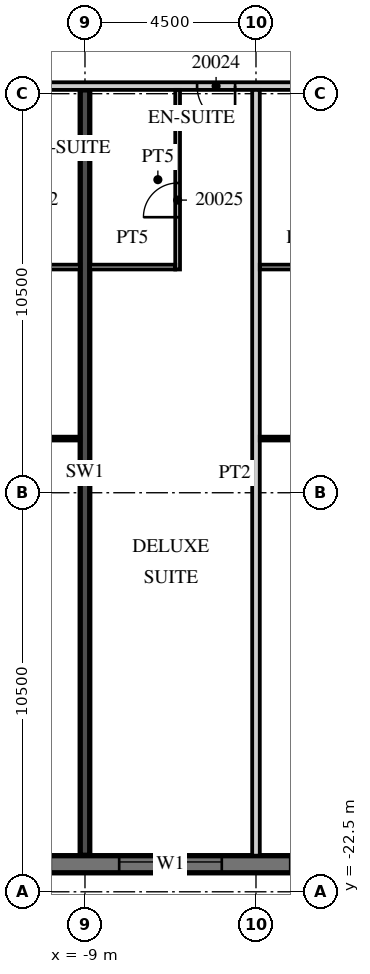
"""IFC4 building model, lengths in metres.
Left out: names, types, materials, properties, quantities, classifications, styles, units other than length and angle.
Written with IfcOpenShell. Run it as: python <this file> out.ifc"""

import sys

from ifc_helpers import new_model, si_unit, direction, frame, frame_2d, origin, place, context, subcontext, project, spatial, rectangle, extrude, element, fill, save


model = new_model("IFC4")
c1 = context("Model", 3, precision=1e-05, world=origin(), true_north=direction((0.0, 1.0)))
c2 = subcontext(c1, "Body", "Model", "MODEL_VIEW")
j1 = project(units=[si_unit("LENGTHUNIT", "METRE"), si_unit("PLANEANGLEUNIT", "RADIAN")], contexts=[c1])
p1 = place(None, origin())
s1 = spatial("IfcSite", under=j1, at=p1, CompositionType="ELEMENT")
p2 = place(p1, origin())
s2 = spatial("IfcBuilding", under=s1, at=p2, CompositionType="ELEMENT")
p3 = place(p2, frame((0.0, 0.0, 96.3)))
s3 = spatial("IfcBuildingStorey", under=s2, at=p3, CompositionType="ELEMENT", Elevation=96.3)
p4 = place(p3, frame((-9.0, -21.54, 0.0), z_axis=(0.0, 0.0, 1.0), x_axis=(0.0, 1.0, 0.0)))
e1 = element("IfcWall", 1, at=p4, inside=s3, PredefinedType="SHEAR", context=c2, shape_type="SweptSolid", body=[
    extrude(rectangle(XDim=20.14, YDim=0.25, at=frame_2d((10.07, 0.0))), origin(), (0.0, 0.0, 1.0), 3.0),
])
p5 = place(p3, frame((-13.5, -21.775, 0.0), z_axis=(0.0, 0.0, 1.0), x_axis=(1.0, 0.0, 0.0)))
e2 = element("IfcWall", 2, at=p5, inside=s3, PredefinedType="SOLIDWALL", context=c2, shape_type="SweptSolid", body=[
    extrude(rectangle(XDim=54.5, YDim=0.45, at=frame_2d((27.25, 0.0))), origin(), (0.0, 0.0, 1.0), 3.0),
])
p6 = place(p5, frame((0.9, 0.0, 0.45)))
e3 = element("IfcOpeningElement", 3, at=p6, cuts=e2, PredefinedType="OPENING", context=c2, shape_type="SweptSolid", body=[
    extrude(rectangle(XDim=2.7, YDim=2.25, at=frame_2d((1.35, 1.125))), frame((0.0, 0.235, 0.0), z_axis=(0.0, -1.0, 0.0), x_axis=(1.0, 0.0, 0.0)), (0.0, 0.0, 1.0), 0.47),
])
p7 = place(p5, frame((5.4, 0.0, 0.45)))
e4 = element("IfcOpeningElement", 4, at=p7, cuts=e2, PredefinedType="OPENING", context=c2, shape_type="SweptSolid", body=[
    extrude(rectangle(XDim=2.7, YDim=2.25, at=frame_2d((1.35, 1.125))), frame((0.0, 0.235, 0.0), z_axis=(0.0, -1.0, 0.0), x_axis=(1.0, 0.0, 0.0)), (0.0, 0.0, 1.0), 0.47),
])
p8 = place(p5, frame((9.9, 0.0, 0.45)))
e5 = element("IfcOpeningElement", 5, at=p8, cuts=e2, PredefinedType="OPENING", context=c2, shape_type="SweptSolid", body=[
    extrude(rectangle(XDim=2.7, YDim=2.25, at=frame_2d((1.35, 1.125))), frame((0.0, 0.235, 0.0), z_axis=(0.0, -1.0, 0.0), x_axis=(1.0, 0.0, 0.0)), (0.0, 0.0, 1.0), 0.47),
])
p9 = place(p5, frame((14.4, 0.0, 0.45)))
e6 = element("IfcOpeningElement", 6, at=p9, cuts=e2, PredefinedType="OPENING", context=c2, shape_type="SweptSolid", body=[
    extrude(rectangle(XDim=2.7, YDim=2.25, at=frame_2d((1.35, 1.125))), frame((0.0, 0.235, 0.0), z_axis=(0.0, -1.0, 0.0), x_axis=(1.0, 0.0, 0.0)), (0.0, 0.0, 1.0), 0.47),
])
p10 = place(p5, frame((18.9, 0.0, 0.45)))
e7 = element("IfcOpeningElement", 7, at=p10, cuts=e2, PredefinedType="OPENING", context=c2, shape_type="SweptSolid", body=[
    extrude(rectangle(XDim=2.7, YDim=2.25, at=frame_2d((1.35, 1.125))), frame((0.0, 0.235, 0.0), z_axis=(0.0, -1.0, 0.0), x_axis=(1.0, 0.0, 0.0)), (0.0, 0.0, 1.0), 0.47),
])
p11 = place(p5, frame((23.4, 0.0, 0.45)))
e8 = element("IfcOpeningElement", 8, at=p11, cuts=e2, PredefinedType="OPENING", context=c2, shape_type="SweptSolid", body=[
    extrude(rectangle(XDim=2.7, YDim=2.25, at=frame_2d((1.35, 1.125))), frame((0.0, 0.235, 0.0), z_axis=(0.0, -1.0, 0.0), x_axis=(1.0, 0.0, 0.0)), (0.0, 0.0, 1.0), 0.47),
])
p12 = place(p5, frame((27.9, 0.0, 0.45)))
e9 = element("IfcOpeningElement", 9, at=p12, cuts=e2, PredefinedType="OPENING", context=c2, shape_type="SweptSolid", body=[
    extrude(rectangle(XDim=2.7, YDim=2.25, at=frame_2d((1.35, 1.125))), frame((0.0, 0.235, 0.0), z_axis=(0.0, -1.0, 0.0), x_axis=(1.0, 0.0, 0.0)), (0.0, 0.0, 1.0), 0.47),
])
p13 = place(p5, frame((32.4, 0.0, 0.45)))
e10 = element("IfcOpeningElement", 10, at=p13, cuts=e2, PredefinedType="OPENING", context=c2, shape_type="SweptSolid", body=[
    extrude(rectangle(XDim=2.7, YDim=2.25, at=frame_2d((1.35, 1.125))), frame((0.0, 0.235, 0.0), z_axis=(0.0, -1.0, 0.0), x_axis=(1.0, 0.0, 0.0)), (0.0, 0.0, 1.0), 0.47),
])
p14 = place(p5, frame((36.9, 0.0, 0.45)))
e11 = element("IfcOpeningElement", 11, at=p14, cuts=e2, PredefinedType="OPENING", context=c2, shape_type="SweptSolid", body=[
    extrude(rectangle(XDim=2.7, YDim=2.25, at=frame_2d((1.35, 1.125))), frame((0.0, 0.235, 0.0), z_axis=(0.0, -1.0, 0.0), x_axis=(1.0, 0.0, 0.0)), (0.0, 0.0, 1.0), 0.47),
])
p15 = place(p5, frame((41.4, 0.0, 0.45)))
e12 = element("IfcOpeningElement", 12, at=p15, cuts=e2, PredefinedType="OPENING", context=c2, shape_type="SweptSolid", body=[
    extrude(rectangle(XDim=2.7, YDim=2.25, at=frame_2d((1.35, 1.125))), frame((0.0, 0.235, 0.0), z_axis=(0.0, -1.0, 0.0), x_axis=(1.0, 0.0, 0.0)), (0.0, 0.0, 1.0), 0.47),
])
p16 = place(p5, frame((45.9, 0.0, 0.45)))
e13 = element("IfcOpeningElement", 13, at=p16, cuts=e2, PredefinedType="OPENING", context=c2, shape_type="SweptSolid", body=[
    extrude(rectangle(XDim=2.7, YDim=2.25, at=frame_2d((1.35, 1.125))), frame((0.0, 0.235, 0.0), z_axis=(0.0, -1.0, 0.0), x_axis=(1.0, 0.0, 0.0)), (0.0, 0.0, 1.0), 0.47),
])
p17 = place(p5, frame((50.4, 0.0, 0.45)))
e14 = element("IfcOpeningElement", 14, at=p17, cuts=e2, PredefinedType="OPENING", context=c2, shape_type="SweptSolid", body=[
    extrude(rectangle(XDim=2.7, YDim=2.25, at=frame_2d((1.35, 1.125))), frame((0.0, 0.235, 0.0), z_axis=(0.0, -1.0, 0.0), x_axis=(1.0, 0.0, 0.0)), (0.0, 0.0, 1.0), 0.47),
])
p18 = place(p3, frame((-13.5, -1.3, 0.0), z_axis=(0.0, 0.0, 1.0), x_axis=(1.0, 0.0, 0.0)))
e15 = element("IfcWall", 15, at=p18, inside=s3, PredefinedType="PARTITIONING", context=c2, shape_type="SweptSolid", body=[
    extrude(rectangle(XDim=58.05, YDim=0.2, at=frame_2d((29.025, 0.0))), origin(), (0.0, 0.0, 1.0), 3.0),
])
p19 = place(p18, frame((0.575, 0.0, 0.0)))
e16 = element("IfcOpeningElement", 16, at=p19, cuts=e15, PredefinedType="OPENING", context=c2, shape_type="SweptSolid", body=[
    extrude(rectangle(XDim=1.0, YDim=2.1, at=frame_2d((0.5, 1.05))), frame((0.0, 0.11, 0.0), z_axis=(0.0, -1.0, 0.0), x_axis=(1.0, 0.0, 0.0)), (0.0, 0.0, 1.0), 0.22),
])
p20 = place(p18, frame((7.45, 0.0, 0.0)))
e17 = element("IfcOpeningElement", 17, at=p20, cuts=e15, PredefinedType="OPENING", context=c2, shape_type="SweptSolid", body=[
    extrude(rectangle(XDim=1.0, YDim=2.1, at=frame_2d((0.5, 1.05))), frame((0.0, 0.11, 0.0), z_axis=(0.0, -1.0, 0.0), x_axis=(1.0, 0.0, 0.0)), (0.0, 0.0, 1.0), 0.22),
])
p21 = place(p18, frame((11.925, 0.0, 0.0)))
e18 = element("IfcOpeningElement", 18, at=p21, cuts=e15, PredefinedType="OPENING", context=c2, shape_type="SweptSolid", body=[
    extrude(rectangle(XDim=1.0, YDim=2.1, at=frame_2d((0.5, 1.05))), frame((0.0, 0.11, 0.0), z_axis=(0.0, -1.0, 0.0), x_axis=(1.0, 0.0, 0.0)), (0.0, 0.0, 1.0), 0.22),
])
p22 = place(p18, frame((14.075, 0.0, 0.0)))
e19 = element("IfcOpeningElement", 19, at=p22, cuts=e15, PredefinedType="OPENING", context=c2, shape_type="SweptSolid", body=[
    extrude(rectangle(XDim=1.0, YDim=2.1, at=frame_2d((0.5, 1.05))), frame((0.0, 0.11, 0.0), z_axis=(0.0, -1.0, 0.0), x_axis=(1.0, 0.0, 0.0)), (0.0, 0.0, 1.0), 0.22),
])
p23 = place(p18, frame((20.925, 0.0, 0.0)))
e20 = element("IfcOpeningElement", 20, at=p23, cuts=e15, PredefinedType="OPENING", context=c2, shape_type="SweptSolid", body=[
    extrude(rectangle(XDim=1.0, YDim=2.1, at=frame_2d((0.5, 1.05))), frame((0.0, 0.11, 0.0), z_axis=(0.0, -1.0, 0.0), x_axis=(1.0, 0.0, 0.0)), (0.0, 0.0, 1.0), 0.22),
])
p24 = place(p18, frame((27.862, 0.0, 0.0)))
e21 = element("IfcOpeningElement", 21, at=p24, cuts=e15, PredefinedType="OPENING", context=c2, shape_type="SweptSolid", body=[
    extrude(rectangle(XDim=1.2, YDim=2.1, at=frame_2d((0.6, 1.05))), frame((0.0, 0.11, 0.0), z_axis=(0.0, -1.0, 0.0), x_axis=(1.0, 0.0, 0.0)), (0.0, 0.0, 1.0), 0.22),
])
p25 = place(p18, frame((33.938, 0.0, 0.0)))
e22 = element("IfcOpeningElement", 22, at=p25, cuts=e15, PredefinedType="OPENING", context=c2, shape_type="SweptSolid", body=[
    extrude(rectangle(XDim=1.2, YDim=2.1, at=frame_2d((0.6, 1.05))), frame((0.0, 0.11, 0.0), z_axis=(0.0, -1.0, 0.0), x_axis=(1.0, 0.0, 0.0)), (0.0, 0.0, 1.0), 0.22),
])
p26 = place(p18, frame((45.862, 0.0, 0.0)))
e23 = element("IfcOpeningElement", 23, at=p26, cuts=e15, PredefinedType="OPENING", context=c2, shape_type="SweptSolid", body=[
    extrude(rectangle(XDim=1.2, YDim=2.1, at=frame_2d((0.6, 1.05))), frame((0.0, 0.11, 0.0), z_axis=(0.0, -1.0, 0.0), x_axis=(1.0, 0.0, 0.0)), (0.0, 0.0, 1.0), 0.22),
])
p27 = place(p18, frame((52.425, 0.0, 0.0)))
e24 = element("IfcOpeningElement", 24, at=p27, cuts=e15, PredefinedType="OPENING", context=c2, shape_type="SweptSolid", body=[
    extrude(rectangle(XDim=1.0, YDim=2.1, at=frame_2d((0.5, 1.05))), frame((0.0, 0.11, 0.0), z_axis=(0.0, -1.0, 0.0), x_axis=(1.0, 0.0, 0.0)), (0.0, 0.0, 1.0), 0.22),
])
p28 = place(p18, frame((56.525, 0.0, 0.0)))
e25 = element("IfcOpeningElement", 25, at=p28, cuts=e15, PredefinedType="OPENING", context=c2, shape_type="SweptSolid", body=[
    extrude(rectangle(XDim=1.0, YDim=2.1, at=frame_2d((0.5, 1.05))), frame((0.0, 0.11, 0.0), z_axis=(0.0, -1.0, 0.0), x_axis=(1.0, 0.0, 0.0)), (0.0, 0.0, 1.0), 0.22),
])
p29 = place(p3, frame((-11.375, -6.062, 0.0), z_axis=(0.0, 0.0, 1.0), x_axis=(1.0, 0.0, 0.0)))
e26 = element("IfcWall", 26, at=p29, inside=s3, PredefinedType="PARTITIONING", context=c2, shape_type="SweptSolid", body=[
    extrude(rectangle(XDim=2.25, YDim=0.125, at=frame_2d((1.125, 0.0))), origin(), (0.0, 0.0, 1.0), 3.0),
])
p30 = place(p3, frame((-13.4, -10.575, 0.0), z_axis=(0.0, 0.0, 1.0), x_axis=(1.0, 0.0, 0.0)))
e27 = element("IfcWall", 27, at=p30, inside=s3, PredefinedType="PARTITIONING", context=c2, shape_type="SweptSolid", body=[
    extrude(rectangle(XDim=4.275, YDim=0.1, at=frame_2d((2.137, 0.0))), origin(), (0.0, 0.0, 1.0), 3.0),
])
p31 = place(p30, frame((0.788, 0.0, 0.0)))
e28 = element("IfcOpeningElement", 28, at=p31, cuts=e27, PredefinedType="OPENING", context=c2, shape_type="SweptSolid", body=[
    extrude(rectangle(XDim=1.5, YDim=2.1, at=frame_2d((0.75, 1.05))), frame((0.0, 0.06, 0.0), z_axis=(0.0, -1.0, 0.0), x_axis=(1.0, 0.0, 0.0)), (0.0, 0.0, 1.0), 0.12),
])
p32 = place(p3, frame((-4.5, -21.55, 0.0), z_axis=(0.0, 0.0, 1.0), x_axis=(0.0, 1.0, 0.0)))
e29 = element("IfcWall", 29, at=p32, inside=s3, PredefinedType="PARTITIONING", context=c2, shape_type="SweptSolid", body=[
    extrude(rectangle(XDim=20.15, YDim=0.2, at=frame_2d((10.075, 0.0))), origin(), (0.0, 0.0, 1.0), 3.0),
])
p33 = place(p3, frame((-6.562, -6.125, 0.0), z_axis=(0.0, 0.0, 1.0), x_axis=(0.0, 1.0, 0.0)))
e30 = element("IfcWall", 30, at=p33, inside=s3, PredefinedType="PARTITIONING", context=c2, shape_type="SweptSolid", body=[
    extrude(rectangle(XDim=4.725, YDim=0.125, at=frame_2d((2.363, 0.0))), origin(), (0.0, 0.0, 1.0), 3.0),
])
p34 = place(p33, frame((1.375, 0.0, 0.0)))
e31 = element("IfcOpeningElement", 31, at=p34, cuts=e30, PredefinedType="OPENING", context=c2, shape_type="SweptSolid", body=[
    extrude(rectangle(XDim=0.9, YDim=2.1, at=frame_2d((0.45, 1.05))), frame((0.0, 0.073, 0.0), z_axis=(0.0, -1.0, 0.0), x_axis=(1.0, 0.0, 0.0)), (0.0, 0.0, 1.0), 0.145),
])
for number, where, z_axis, x_axis in (
    (32, (-8.875, -6.062, 0.0), (0.0, 0.0, 1.0), (1.0, 0.0, 0.0)),
    (33, (-4.4, -6.062, 0.0), (0.0, 0.0, 1.0), (1.0, 0.0, 0.0)),
):
    element("IfcWall", number, at=place(p3, frame(where, z_axis=z_axis, x_axis=x_axis)), inside=s3, PredefinedType="PARTITIONING", context=c2, shape_type="SweptSolid", body=[
        extrude(rectangle(XDim=2.25, YDim=0.125, at=frame_2d((1.125, 0.0))), origin(), (0.0, 0.0, 1.0), 3.0),
    ])
p35 = place(p3, frame((-4.4, -10.575, 0.0), z_axis=(0.0, 0.0, 1.0), x_axis=(1.0, 0.0, 0.0)))
e34 = element("IfcWall", 34, at=p35, inside=s3, PredefinedType="PARTITIONING", context=c2, shape_type="SweptSolid", body=[
    extrude(rectangle(XDim=4.275, YDim=0.1, at=frame_2d((2.137, 0.0))), origin(), (0.0, 0.0, 1.0), 3.0),
])
p36 = place(p35, frame((1.388, 0.0, 0.0)))
e35 = element("IfcOpeningElement", 35, at=p36, cuts=e34, PredefinedType="OPENING", context=c2, shape_type="SweptSolid", body=[
    extrude(rectangle(XDim=1.5, YDim=2.1, at=frame_2d((0.75, 1.05))), frame((0.0, 0.06, 0.0), z_axis=(0.0, -1.0, 0.0), x_axis=(1.0, 0.0, 0.0)), (0.0, 0.0, 1.0), 0.12),
])
p37 = place(p7, origin())
e36 = element("IfcWindow", 36, at=p37, inside=s3, PartitioningType="SINGLE_PANEL", PredefinedType="WINDOW", context=c2, shape_type="SweptSolid", body=[
    extrude(rectangle(XDim=2.7, YDim=2.25, at=frame_2d((1.35, 1.125))), frame((0.0, 0.09, 0.0), z_axis=(0.0, -1.0, 0.0), x_axis=(1.0, 0.0, 0.0)), (0.0, 0.0, 1.0), 0.06),
])
fill(e4, e36)
p38 = place(p20, origin())
e37 = element("IfcDoor", 37, at=p38, inside=s3, OperationType="SINGLE_SWING_RIGHT", PredefinedType="DOOR", context=c2, shape_type="SweptSolid", body=[
    extrude(rectangle(XDim=1.0, YDim=2.1, at=frame_2d((0.5, 1.05))), frame((0.0, 0.025, 0.0), z_axis=(0.0, -1.0, 0.0), x_axis=(1.0, 0.0, 0.0)), (0.0, 0.0, 1.0), 0.05),
])
fill(e17, e37)
p39 = place(p34, origin())
e38 = element("IfcDoor", 38, at=p39, inside=s3, OperationType="SINGLE_SWING_LEFT", PredefinedType="DOOR", context=c2, shape_type="SweptSolid", body=[
    extrude(rectangle(XDim=0.9, YDim=2.1, at=frame_2d((0.45, 1.05))), frame((0.0, 0.025, 0.0), z_axis=(0.0, -1.0, 0.0), x_axis=(1.0, 0.0, 0.0)), (0.0, 0.0, 1.0), 0.05),
])
fill(e31, e38)
save(model, sys.argv[1])
